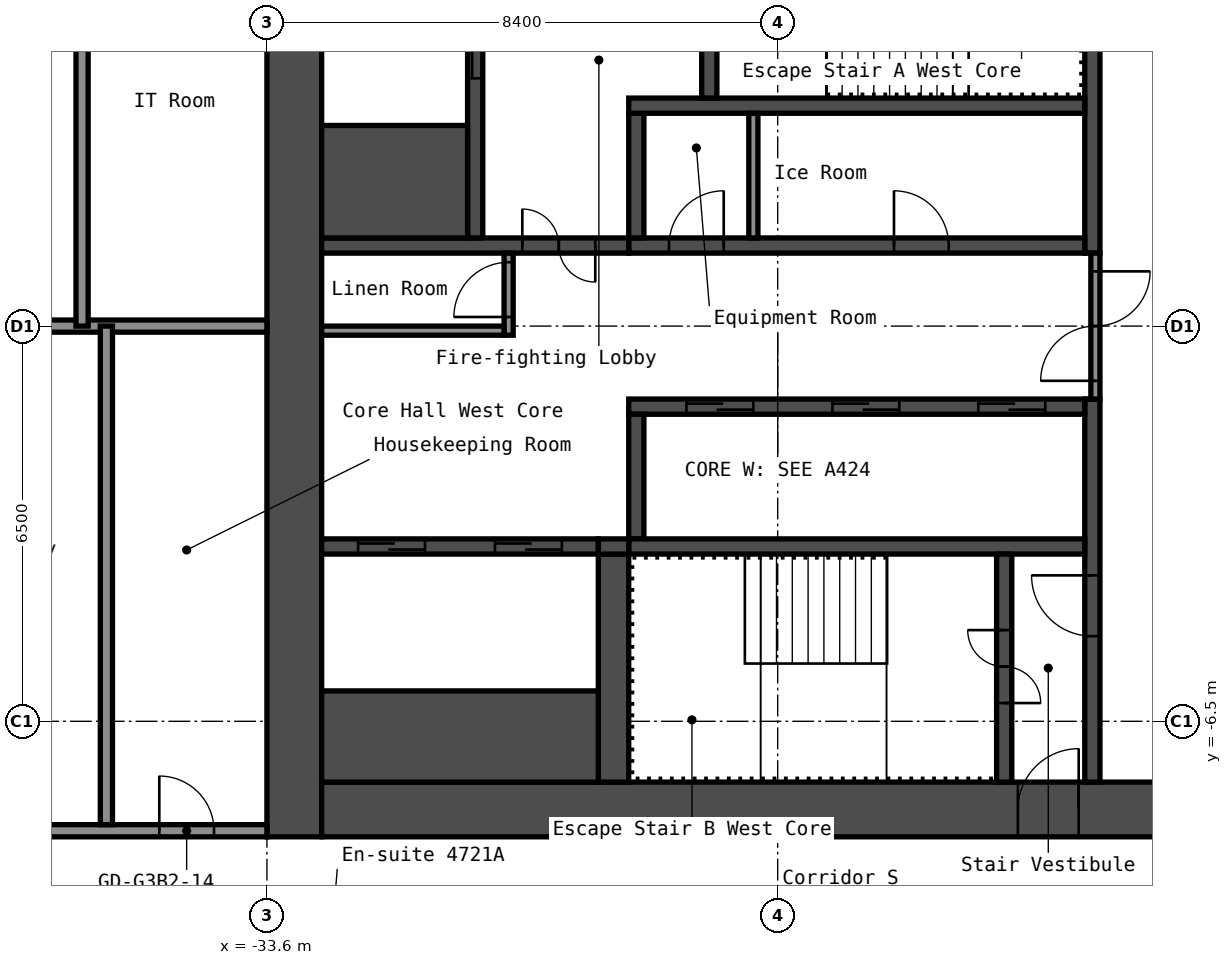
"""IFC4 building model, lengths in metres.
Left out: names, types, materials, properties, quantities, classifications, styles, units other than length and angle.
Written with IfcOpenShell. Run it as: python <this file> out.ifc"""

import sys

from ifc_helpers import new_model, si_unit, direction, frame, frame_2d, origin, place, context, subcontext, project, spatial, rectangle, extrude, element, fill, save


model = new_model("IFC4")
c1 = context("Model", 3, precision=1e-05, world=origin(), true_north=direction((0.0, 1.0)))
c2 = subcontext(c1, "Body", "Model", "MODEL_VIEW")
j1 = project(units=[si_unit("LENGTHUNIT", "METRE"), si_unit("PLANEANGLEUNIT", "RADIAN")], contexts=[c1])
p1 = place(None, origin())
s1 = spatial("IfcSite", under=j1, at=p1, CompositionType="ELEMENT")
p2 = place(p1, origin())
s2 = spatial("IfcBuilding", under=s1, at=p2, CompositionType="ELEMENT")
p3 = place(p2, frame((0.0, 0.0, 166.2)))
s3 = spatial("IfcBuildingStorey", under=s2, at=p3, CompositionType="ELEMENT", Elevation=166.2)
p4 = place(p3, frame((-33.15, -8.4, 0.0), z_axis=(0.0, 0.0, 1.0), x_axis=(0.0, 1.0, 0.0)))
e1 = element("IfcWall", 1, at=p4, inside=s3, PredefinedType="SHEAR", context=c2, shape_type="SweptSolid", body=[
    extrude(rectangle(XDim=16.8, YDim=0.9, at=frame_2d((8.4, 0.0))), origin(), (0.0, 0.0, 1.0), 2.75),
])
p5 = place(p3, frame((-32.7, -7.95, 0.0), z_axis=(0.0, 0.0, 1.0), x_axis=(1.0, 0.0, 0.0)))
e2 = element("IfcWall", 2, at=p5, inside=s3, PredefinedType="SHEAR", context=c2, shape_type="SweptSolid", body=[
    extrude(rectangle(XDim=15.0, YDim=0.9, at=frame_2d((7.5, 0.0))), origin(), (0.0, 0.0, 1.0), 2.75),
])
p6 = place(p5, frame((11.45, 0.0, 0.0)))
e3 = element("IfcOpeningElement", 3, at=p6, cuts=e2, PredefinedType="OPENING", context=c2, shape_type="SweptSolid", body=[
    extrude(rectangle(XDim=1.0, YDim=2.1, at=frame_2d((0.5, 1.05))), frame((0.0, 0.46, 0.0), z_axis=(0.0, -1.0, 0.0), x_axis=(1.0, 0.0, 0.0)), (0.0, 0.0, 1.0), 0.92),
])
p7 = place(p3, frame((-20.025, 1.2, 0.0), z_axis=(0.0, 0.0, 1.0), x_axis=(0.0, 1.0, 0.0)))
e4 = element("IfcWall", 4, at=p7, inside=s3, PredefinedType="SHEAR", context=c2, shape_type="SweptSolid", body=[
    extrude(rectangle(XDim=6.3, YDim=0.25, at=frame_2d((3.15, 0.0))), origin(), (0.0, 0.0, 1.0), 2.75),
])
p8 = place(p3, frame((-20.025, -7.5, 0.0), z_axis=(0.0, 0.0, 1.0), x_axis=(0.0, 1.0, 0.0)))
e5 = element("IfcWall", 5, at=p8, inside=s3, PredefinedType="SHEAR", context=c2, shape_type="SweptSolid", body=[
    extrude(rectangle(XDim=6.3, YDim=0.25, at=frame_2d((3.15, 0.0))), origin(), (0.0, 0.0, 1.0), 2.75),
])
p9 = place(p8, frame((2.4, 0.0, 0.0)))
e6 = element("IfcOpeningElement", 6, at=p9, cuts=e5, PredefinedType="OPENING", context=c2, shape_type="SweptSolid", body=[
    extrude(rectangle(XDim=1.0, YDim=2.1, at=frame_2d((0.5, 1.05))), frame((0.0, 0.135, 0.0), z_axis=(0.0, -1.0, 0.0), x_axis=(1.0, 0.0, 0.0)), (0.0, 0.0, 1.0), 0.27),
])
p10 = place(p3, frame((-27.65, 1.325, 0.0), z_axis=(0.0, 0.0, 1.0), x_axis=(1.0, 0.0, 0.0)))
e7 = element("IfcWall", 7, at=p10, inside=s3, PredefinedType="SHEAR", context=c2, shape_type="SweptSolid", body=[
    extrude(rectangle(XDim=7.5, YDim=0.25, at=frame_2d((3.75, 0.0))), origin(), (0.0, 0.0, 1.0), 2.75),
])
p11 = place(p10, frame((4.363, 0.0, 0.0)))
e8 = element("IfcOpeningElement", 8, at=p11, cuts=e7, PredefinedType="OPENING", context=c2, shape_type="SweptSolid", body=[
    extrude(rectangle(XDim=0.9, YDim=2.1, at=frame_2d((0.45, 1.05))), frame((0.0, 0.135, 0.0), z_axis=(0.0, -1.0, 0.0), x_axis=(1.0, 0.0, 0.0)), (0.0, 0.0, 1.0), 0.27),
])
p12 = place(p10, frame((0.663, 0.0, 0.0)))
e9 = element("IfcOpeningElement", 9, at=p12, cuts=e7, PredefinedType="OPENING", context=c2, shape_type="SweptSolid", body=[
    extrude(rectangle(XDim=0.9, YDim=2.1, at=frame_2d((0.45, 1.05))), frame((0.0, 0.135, 0.0), z_axis=(0.0, -1.0, 0.0), x_axis=(1.0, 0.0, 0.0)), (0.0, 0.0, 1.0), 0.27),
])
p13 = place(p3, frame((-27.525, 1.45, 0.0), z_axis=(0.0, 0.0, 1.0), x_axis=(0.0, 1.0, 0.0)))
e10 = element("IfcWall", 10, at=p13, inside=s3, PredefinedType="SHEAR", context=c2, shape_type="SweptSolid", body=[
    extrude(rectangle(XDim=2.05, YDim=0.25, at=frame_2d((1.025, 0.0))), origin(), (0.0, 0.0, 1.0), 2.75),
])
p14 = place(p3, frame((-27.65, 3.625, 0.0), z_axis=(0.0, 0.0, 1.0), x_axis=(1.0, 0.0, 0.0)))
e11 = element("IfcWall", 11, at=p14, inside=s3, PredefinedType="SHEAR", context=c2, shape_type="SweptSolid", body=[
    extrude(rectangle(XDim=7.5, YDim=0.25, at=frame_2d((3.75, 0.0))), origin(), (0.0, 0.0, 1.0), 2.75),
])
p15 = place(p3, frame((-26.325, 3.75, 0.0), z_axis=(0.0, 0.0, 1.0), x_axis=(0.0, 1.0, 0.0)))
e12 = element("IfcWall", 12, at=p15, inside=s3, PredefinedType="SHEAR", context=c2, shape_type="SweptSolid", body=[
    extrude(rectangle(XDim=3.75, YDim=0.25, at=frame_2d((1.875, 0.0))), origin(), (0.0, 0.0, 1.0), 2.75),
])
p16 = place(p15, frame((1.25, 0.0, 0.0)))
e13 = element("IfcOpeningElement", 13, at=p16, cuts=e12, PredefinedType="OPENING", context=c2, shape_type="SweptSolid", body=[
    extrude(rectangle(XDim=1.2, YDim=2.1, at=frame_2d((0.6, 1.05))), frame((0.0, 0.135, 0.0), z_axis=(0.0, -1.0, 0.0), x_axis=(1.0, 0.0, 0.0)), (0.0, 0.0, 1.0), 0.27),
])
p17 = place(p3, frame((-32.7, 1.325, 0.0), z_axis=(0.0, 0.0, 1.0), x_axis=(1.0, 0.0, 0.0)))
e14 = element("IfcWall", 14, at=p17, inside=s3, PredefinedType="SHEAR", context=c2, shape_type="SweptSolid", body=[
    extrude(rectangle(XDim=5.05, YDim=0.25, at=frame_2d((2.525, 0.0))), origin(), (0.0, 0.0, 1.0), 2.75),
])
p18 = place(p17, frame((3.3, 0.0, 0.0)))
e15 = element("IfcOpeningElement", 15, at=p18, cuts=e14, PredefinedType="OPENING", context=c2, shape_type="SweptSolid", body=[
    extrude(rectangle(XDim=1.2, YDim=2.1, at=frame_2d((0.6, 1.05))), frame((0.0, 0.135, 0.0), z_axis=(0.0, -1.0, 0.0), x_axis=(1.0, 0.0, 0.0)), (0.0, 0.0, 1.0), 0.27),
])
p19 = place(p3, frame((-30.175, 1.45, 0.0), z_axis=(0.0, 0.0, 1.0), x_axis=(0.0, 1.0, 0.0)))
e16 = element("IfcWall", 16, at=p19, inside=s3, PredefinedType="SHEAR", context=c2, shape_type="SweptSolid", body=[
    extrude(rectangle(XDim=6.05, YDim=0.25, at=frame_2d((3.025, 0.0))), origin(), (0.0, 0.0, 1.0), 2.75),
])
p20 = place(p19, frame((2.625, 0.0, 0.0)))
e17 = element("IfcOpeningElement", 17, at=p20, cuts=e16, PredefinedType="OPENING", context=c2, shape_type="SweptSolid", body=[
    extrude(rectangle(XDim=1.1, YDim=2.1, at=frame_2d((0.55, 1.05))), frame((0.0, 0.135, 0.0), z_axis=(0.0, -1.0, 0.0), x_axis=(1.0, 0.0, 0.0)), (0.0, 0.0, 1.0), 0.27),
])
p21 = place(p3, frame((-32.7, 2.375, 0.0), z_axis=(0.0, 0.0, 1.0), x_axis=(1.0, 0.0, 0.0)))
e18 = element("IfcWall", 18, at=p21, inside=s3, PredefinedType="SHEAR", context=c2, shape_type="SweptSolid", body=[
    extrude(rectangle(XDim=2.4, YDim=1.85, at=frame_2d((1.2, 0.0))), origin(), (0.0, 0.0, 1.0), 2.75),
])
p22 = place(p3, frame((-27.65, -1.325, 0.0), z_axis=(0.0, 0.0, 1.0), x_axis=(1.0, 0.0, 0.0)))
e19 = element("IfcWall", 19, at=p22, inside=s3, PredefinedType="SHEAR", context=c2, shape_type="SweptSolid", body=[
    extrude(rectangle(XDim=7.5, YDim=0.25, at=frame_2d((3.75, 0.0))), origin(), (0.0, 0.0, 1.0), 2.75),
])
p23 = place(p22, frame((5.75, 0.0, 0.0)))
e20 = element("IfcOpeningElement", 20, at=p23, cuts=e19, PredefinedType="OPENING", context=c2, shape_type="SweptSolid", body=[
    extrude(rectangle(XDim=1.1, YDim=2.1, at=frame_2d((0.55, 1.05))), frame((0.0, 0.135, 0.0), z_axis=(0.0, -1.0, 0.0), x_axis=(1.0, 0.0, 0.0)), (0.0, 0.0, 1.0), 0.27),
])
p24 = place(p22, frame((3.35, 0.0, 0.0)))
e21 = element("IfcOpeningElement", 21, at=p24, cuts=e19, PredefinedType="OPENING", context=c2, shape_type="SweptSolid", body=[
    extrude(rectangle(XDim=1.1, YDim=2.1, at=frame_2d((0.55, 1.05))), frame((0.0, 0.135, 0.0), z_axis=(0.0, -1.0, 0.0), x_axis=(1.0, 0.0, 0.0)), (0.0, 0.0, 1.0), 0.27),
])
p25 = place(p22, frame((0.95, 0.0, 0.0)))
e22 = element("IfcOpeningElement", 22, at=p25, cuts=e19, PredefinedType="OPENING", context=c2, shape_type="SweptSolid", body=[
    extrude(rectangle(XDim=1.1, YDim=2.1, at=frame_2d((0.55, 1.05))), frame((0.0, 0.135, 0.0), z_axis=(0.0, -1.0, 0.0), x_axis=(1.0, 0.0, 0.0)), (0.0, 0.0, 1.0), 0.27),
])
p26 = place(p3, frame((-27.525, -3.5, 0.0), z_axis=(0.0, 0.0, 1.0), x_axis=(0.0, 1.0, 0.0)))
e23 = element("IfcWall", 23, at=p26, inside=s3, PredefinedType="SHEAR", context=c2, shape_type="SweptSolid", body=[
    extrude(rectangle(XDim=2.05, YDim=0.25, at=frame_2d((1.025, 0.0))), origin(), (0.0, 0.0, 1.0), 2.75),
])
p27 = place(p3, frame((-27.65, -3.625, 0.0), z_axis=(0.0, 0.0, 1.0), x_axis=(1.0, 0.0, 0.0)))
e24 = element("IfcWall", 24, at=p27, inside=s3, PredefinedType="SHEAR", context=c2, shape_type="SweptSolid", body=[
    extrude(rectangle(XDim=7.5, YDim=0.25, at=frame_2d((3.75, 0.0))), origin(), (0.0, 0.0, 1.0), 2.75),
])
p28 = place(p3, frame((-21.475, -7.5, 0.0), z_axis=(0.0, 0.0, 1.0), x_axis=(0.0, 1.0, 0.0)))
e25 = element("IfcWall", 25, at=p28, inside=s3, PredefinedType="SHEAR", context=c2, shape_type="SweptSolid", body=[
    extrude(rectangle(XDim=3.75, YDim=0.25, at=frame_2d((1.875, 0.0))), origin(), (0.0, 0.0, 1.0), 2.75),
])
p29 = place(p28, frame((1.3, 0.0, 0.0)))
e26 = element("IfcOpeningElement", 26, at=p29, cuts=e25, PredefinedType="OPENING", context=c2, shape_type="SweptSolid", body=[
    extrude(rectangle(XDim=1.2, YDim=2.1, at=frame_2d((0.6, 1.05))), frame((0.0, 0.135, 0.0), z_axis=(0.0, -1.0, 0.0), x_axis=(1.0, 0.0, 0.0)), (0.0, 0.0, 1.0), 0.27),
])
p30 = place(p3, frame((-27.9, -7.5, 0.0), z_axis=(0.0, 0.0, 1.0), x_axis=(0.0, 1.0, 0.0)))
e27 = element("IfcWall", 27, at=p30, inside=s3, PredefinedType="SHEAR", context=c2, shape_type="SweptSolid", body=[
    extrude(rectangle(XDim=3.75, YDim=0.5, at=frame_2d((1.875, 0.0))), origin(), (0.0, 0.0, 1.0), 2.75),
])
p31 = place(p3, frame((-32.7, -3.625, 0.0), z_axis=(0.0, 0.0, 1.0), x_axis=(1.0, 0.0, 0.0)))
e28 = element("IfcWall", 28, at=p31, inside=s3, PredefinedType="SHEAR", context=c2, shape_type="SweptSolid", body=[
    extrude(rectangle(XDim=4.55, YDim=0.25, at=frame_2d((2.275, 0.0))), origin(), (0.0, 0.0, 1.0), 2.75),
])
p32 = place(p31, frame((2.85, 0.0, 0.0)))
e29 = element("IfcOpeningElement", 29, at=p32, cuts=e28, PredefinedType="OPENING", context=c2, shape_type="SweptSolid", body=[
    extrude(rectangle(XDim=1.1, YDim=2.1, at=frame_2d((0.55, 1.05))), frame((0.0, 0.135, 0.0), z_axis=(0.0, -1.0, 0.0), x_axis=(1.0, 0.0, 0.0)), (0.0, 0.0, 1.0), 0.27),
])
p33 = place(p31, frame((0.6, 0.0, 0.0)))
e30 = element("IfcOpeningElement", 30, at=p33, cuts=e28, PredefinedType="OPENING", context=c2, shape_type="SweptSolid", body=[
    extrude(rectangle(XDim=1.1, YDim=2.1, at=frame_2d((0.55, 1.05))), frame((0.0, 0.135, 0.0), z_axis=(0.0, -1.0, 0.0), x_axis=(1.0, 0.0, 0.0)), (0.0, 0.0, 1.0), 0.27),
])
p34 = place(p3, frame((-32.7, -6.75, 0.0), z_axis=(0.0, 0.0, 1.0), x_axis=(1.0, 0.0, 0.0)))
e31 = element("IfcWall", 31, at=p34, inside=s3, PredefinedType="SHEAR", context=c2, shape_type="SweptSolid", body=[
    extrude(rectangle(XDim=4.55, YDim=1.5, at=frame_2d((2.275, 0.0))), origin(), (0.0, 0.0, 1.0), 2.75),
])
p35 = place(p3, frame((-28.15, -3.625, 0.0), z_axis=(0.0, 0.0, 1.0), x_axis=(1.0, 0.0, 0.0)))
e32 = element("IfcWall", 32, at=p35, inside=s3, PredefinedType="SHEAR", context=c2, shape_type="SweptSolid", body=[
    extrude(rectangle(XDim=0.5, YDim=0.25, at=frame_2d((0.25, 0.0))), origin(), (0.0, 0.0, 1.0), 2.75),
])
p36 = place(p3, frame((-19.975, -1.2, 0.0), z_axis=(0.0, 0.0, 1.0), x_axis=(0.0, 1.0, 0.0)))
e33 = element("IfcWall", 33, at=p36, inside=s3, PredefinedType="PARTITIONING", context=c2, shape_type="SweptSolid", body=[
    extrude(rectangle(XDim=2.4, YDim=0.15, at=frame_2d((1.2, 0.0))), origin(), (0.0, 0.0, 1.0), 2.75),
])
p37 = place(p36, frame((0.3, 0.0, 0.0)))
e34 = element("IfcOpeningElement", 34, at=p37, cuts=e33, PredefinedType="OPENING", context=c2, shape_type="SweptSolid", body=[
    extrude(rectangle(XDim=1.8, YDim=2.1, at=frame_2d((0.9, 1.05))), frame((0.0, 0.085, 0.0), z_axis=(0.0, -1.0, 0.0), x_axis=(1.0, 0.0, 0.0)), (0.0, 0.0, 1.0), 0.17),
])
p38 = place(p3, frame((-29.625, -0.15, 0.0), z_axis=(0.0, 0.0, 1.0), x_axis=(0.0, 1.0, 0.0)))
e35 = element("IfcWall", 35, at=p38, inside=s3, PredefinedType="PARTITIONING", context=c2, shape_type="SweptSolid", body=[
    extrude(rectangle(XDim=1.35, YDim=0.15, at=frame_2d((0.675, 0.0))), origin(), (0.0, 0.0, 1.0), 2.75),
])
p39 = place(p38, frame((0.3, 0.0, 0.0)))
e36 = element("IfcOpeningElement", 36, at=p39, cuts=e35, PredefinedType="OPENING", context=c2, shape_type="SweptSolid", body=[
    extrude(rectangle(XDim=0.9, YDim=2.1, at=frame_2d((0.45, 1.05))), frame((0.0, 0.085, 0.0), z_axis=(0.0, -1.0, 0.0), x_axis=(1.0, 0.0, 0.0)), (0.0, 0.0, 1.0), 0.17),
])
p40 = place(p3, frame((-32.7, -0.075, 0.0), z_axis=(0.0, 0.0, 1.0), x_axis=(1.0, 0.0, 0.0)))
e37 = element("IfcWall", 37, at=p40, inside=s3, PredefinedType="PARTITIONING", context=c2, shape_type="SweptSolid", body=[
    extrude(rectangle(XDim=3.0, YDim=0.15, at=frame_2d((1.5, 0.0))), origin(), (0.0, 0.0, 1.0), 2.75),
])
p41 = place(p3, frame((-25.6, 1.45, 0.0), z_axis=(0.0, 0.0, 1.0), x_axis=(0.0, 1.0, 0.0)))
e38 = element("IfcWall", 38, at=p41, inside=s3, PredefinedType="PARTITIONING", context=c2, shape_type="SweptSolid", body=[
    extrude(rectangle(XDim=2.05, YDim=0.15, at=frame_2d((1.025, 0.0))), origin(), (0.0, 0.0, 1.0), 2.75),
])
p42 = place(p3, frame((-40.2, -8.3, 0.0), z_axis=(0.0, 0.0, 1.0), x_axis=(1.0, 0.0, 0.0)))
e39 = element("IfcWall", 39, at=p42, inside=s3, PredefinedType="PARTITIONING", context=c2, shape_type="SweptSolid", body=[
    extrude(rectangle(XDim=6.6, YDim=0.2, at=frame_2d((3.3, 0.0))), origin(), (0.0, 0.0, 1.0), 2.75),
])
p43 = place(p42, frame((1.53, 0.0, 0.0)))
e40 = element("IfcOpeningElement", 40, at=p43, cuts=e39, PredefinedType="OPENING", context=c2, shape_type="SweptSolid", body=[
    extrude(rectangle(XDim=0.9, YDim=2.1, at=frame_2d((0.45, 1.05))), frame((0.0, 0.11, 0.0), z_axis=(0.0, -1.0, 0.0), x_axis=(1.0, 0.0, 0.0)), (0.0, 0.0, 1.0), 0.22),
])
p44 = place(p42, frame((4.83, 0.0, 0.0)))
e41 = element("IfcOpeningElement", 41, at=p44, cuts=e39, PredefinedType="OPENING", context=c2, shape_type="SweptSolid", body=[
    extrude(rectangle(XDim=0.9, YDim=2.1, at=frame_2d((0.45, 1.05))), frame((0.0, 0.11, 0.0), z_axis=(0.0, -1.0, 0.0), x_axis=(1.0, 0.0, 0.0)), (0.0, 0.0, 1.0), 0.22),
])
p45 = place(p3, frame((-40.1, 0.0, 0.0), z_axis=(0.0, 0.0, 1.0), x_axis=(1.0, 0.0, 0.0)))
e42 = element("IfcWall", 42, at=p45, inside=s3, PredefinedType="PARTITIONING", context=c2, shape_type="SweptSolid", body=[
    extrude(rectangle(XDim=6.5, YDim=0.2, at=frame_2d((3.25, 0.0))), origin(), (0.0, 0.0, 1.0), 2.75),
])
for number, where, z_axis, x_axis in (
    (43, (-36.64, 0.0, 0.0), (0.0, 0.0, 1.0), (0.0, 1.0, 0.0)),
    (44, (-36.24, -8.2, 0.0), (0.0, 0.0, 1.0), (0.0, 1.0, 0.0)),
):
    element("IfcWall", number, at=place(p3, frame(where, z_axis=z_axis, x_axis=x_axis)), inside=s3, PredefinedType="PARTITIONING", context=c2, shape_type="SweptSolid", body=[
        extrude(rectangle(XDim=8.2, YDim=0.2, at=frame_2d((4.1, 0.0))), origin(), (0.0, 0.0, 1.0), 2.75),
    ])
p46 = place(p6, origin())
e45 = element("IfcDoor", 45, at=p46, inside=s3, OperationType="SINGLE_SWING_LEFT", PredefinedType="DOOR", context=c2, shape_type="SweptSolid", body=[
    extrude(rectangle(XDim=1.0, YDim=2.1, at=frame_2d((0.5, 1.05))), frame((0.0, 0.025, 0.0), z_axis=(0.0, -1.0, 0.0), x_axis=(1.0, 0.0, 0.0)), (0.0, 0.0, 1.0), 0.05),
])
fill(e3, e45)
p47 = place(p29, origin())
e46 = element("IfcDoor", 46, at=p47, inside=s3, OperationType="DOUBLE_DOOR_SINGLE_SWING", PredefinedType="DOOR", context=c2, shape_type="SweptSolid", body=[
    extrude(rectangle(XDim=1.2, YDim=2.1, at=frame_2d((0.6, 1.05))), frame((0.0, 0.025, 0.0), z_axis=(0.0, -1.0, 0.0), x_axis=(1.0, 0.0, 0.0)), (0.0, 0.0, 1.0), 0.05),
])
fill(e26, e46)
p48 = place(p9, origin())
e47 = element("IfcDoor", 47, at=p48, inside=s3, OperationType="SINGLE_SWING_LEFT", PredefinedType="DOOR", context=c2, shape_type="SweptSolid", body=[
    extrude(rectangle(XDim=1.0, YDim=2.1, at=frame_2d((0.5, 1.05))), frame((0.0, 0.025, 0.0), z_axis=(0.0, -1.0, 0.0), x_axis=(1.0, 0.0, 0.0)), (0.0, 0.0, 1.0), 0.05),
])
fill(e6, e47)
p49 = place(p18, origin())
e48 = element("IfcDoor", 48, at=p49, inside=s3, OperationType="DOUBLE_DOOR_SINGLE_SWING", PredefinedType="DOOR", context=c2, shape_type="SweptSolid", body=[
    extrude(rectangle(XDim=1.2, YDim=2.1, at=frame_2d((0.6, 1.05))), frame((0.0, 0.025, 0.0), z_axis=(0.0, -1.0, 0.0), x_axis=(1.0, 0.0, 0.0)), (0.0, 0.0, 1.0), 0.05),
])
fill(e15, e48)
p50 = place(p37, origin())
e49 = element("IfcDoor", 49, at=p50, inside=s3, OperationType="DOUBLE_DOOR_SINGLE_SWING", PredefinedType="DOOR", context=c2, shape_type="SweptSolid", body=[
    extrude(rectangle(XDim=1.8, YDim=2.1, at=frame_2d((0.9, 1.05))), frame((0.0, 0.025, 0.0), z_axis=(0.0, -1.0, 0.0), x_axis=(1.0, 0.0, 0.0)), (0.0, 0.0, 1.0), 0.05),
])
fill(e34, e49)
p51 = place(p39, origin())
e50 = element("IfcDoor", 50, at=p51, inside=s3, OperationType="SINGLE_SWING_RIGHT", PredefinedType="DOOR", context=c2, shape_type="SweptSolid", body=[
    extrude(rectangle(XDim=0.9, YDim=2.1, at=frame_2d((0.45, 1.05))), frame((0.0, 0.025, 0.0), z_axis=(0.0, -1.0, 0.0), x_axis=(1.0, 0.0, 0.0)), (0.0, 0.0, 1.0), 0.05),
])
fill(e36, e50)
p52 = place(p11, origin())
e51 = element("IfcDoor", 51, at=p52, inside=s3, OperationType="SINGLE_SWING_RIGHT", PredefinedType="DOOR", context=c2, shape_type="SweptSolid", body=[
    extrude(rectangle(XDim=0.9, YDim=2.1, at=frame_2d((0.45, 1.05))), frame((0.0, 0.025, 0.0), z_axis=(0.0, -1.0, 0.0), x_axis=(1.0, 0.0, 0.0)), (0.0, 0.0, 1.0), 0.05),
])
fill(e8, e51)
p53 = place(p12, origin())
e52 = element("IfcDoor", 52, at=p53, inside=s3, OperationType="SINGLE_SWING_LEFT", PredefinedType="DOOR", context=c2, shape_type="SweptSolid", body=[
    extrude(rectangle(XDim=0.9, YDim=2.1, at=frame_2d((0.45, 1.05))), frame((0.0, 0.025, 0.0), z_axis=(0.0, -1.0, 0.0), x_axis=(1.0, 0.0, 0.0)), (0.0, 0.0, 1.0), 0.05),
])
fill(e9, e52)
p54 = place(p23, origin())
e53 = element("IfcDoor", 53, at=p54, inside=s3, OperationType="DOUBLE_DOOR_SLIDING", PredefinedType="DOOR", context=c2, shape_type="SweptSolid", body=[
    extrude(rectangle(XDim=1.1, YDim=2.1, at=frame_2d((0.55, 1.05))), frame((0.0, 0.025, 0.0), z_axis=(0.0, -1.0, 0.0), x_axis=(1.0, 0.0, 0.0)), (0.0, 0.0, 1.0), 0.05),
])
fill(e20, e53)
p55 = place(p24, origin())
e54 = element("IfcDoor", 54, at=p55, inside=s3, OperationType="DOUBLE_DOOR_SLIDING", PredefinedType="DOOR", context=c2, shape_type="SweptSolid", body=[
    extrude(rectangle(XDim=1.1, YDim=2.1, at=frame_2d((0.55, 1.05))), frame((0.0, 0.025, 0.0), z_axis=(0.0, -1.0, 0.0), x_axis=(1.0, 0.0, 0.0)), (0.0, 0.0, 1.0), 0.05),
])
fill(e21, e54)
p56 = place(p25, origin())
e55 = element("IfcDoor", 55, at=p56, inside=s3, OperationType="DOUBLE_DOOR_SLIDING", PredefinedType="DOOR", context=c2, shape_type="SweptSolid", body=[
    extrude(rectangle(XDim=1.1, YDim=2.1, at=frame_2d((0.55, 1.05))), frame((0.0, 0.025, 0.0), z_axis=(0.0, -1.0, 0.0), x_axis=(1.0, 0.0, 0.0)), (0.0, 0.0, 1.0), 0.05),
])
fill(e22, e55)
p57 = place(p20, origin())
e56 = element("IfcDoor", 56, at=p57, inside=s3, OperationType="DOUBLE_DOOR_SLIDING", PredefinedType="DOOR", context=c2, shape_type="SweptSolid", body=[
    extrude(rectangle(XDim=1.1, YDim=2.1, at=frame_2d((0.55, 1.05))), frame((0.0, 0.025, 0.0), z_axis=(0.0, -1.0, 0.0), x_axis=(1.0, 0.0, 0.0)), (0.0, 0.0, 1.0), 0.05),
])
fill(e17, e56)
p58 = place(p32, origin())
e57 = element("IfcDoor", 57, at=p58, inside=s3, OperationType="DOUBLE_DOOR_SLIDING", PredefinedType="DOOR", context=c2, shape_type="SweptSolid", body=[
    extrude(rectangle(XDim=1.1, YDim=2.1, at=frame_2d((0.55, 1.05))), frame((0.0, 0.025, 0.0), z_axis=(0.0, -1.0, 0.0), x_axis=(1.0, 0.0, 0.0)), (0.0, 0.0, 1.0), 0.05),
])
fill(e29, e57)
p59 = place(p33, origin())
e58 = element("IfcDoor", 58, at=p59, inside=s3, OperationType="DOUBLE_DOOR_SLIDING", PredefinedType="DOOR", context=c2, shape_type="SweptSolid", body=[
    extrude(rectangle(XDim=1.1, YDim=2.1, at=frame_2d((0.55, 1.05))), frame((0.0, 0.025, 0.0), z_axis=(0.0, -1.0, 0.0), x_axis=(1.0, 0.0, 0.0)), (0.0, 0.0, 1.0), 0.05),
])
fill(e30, e58)
p60 = place(p44, origin())
e59 = element("IfcDoor", 59, at=p60, inside=s3, OperationType="SINGLE_SWING_RIGHT", PredefinedType="DOOR", context=c2, shape_type="SweptSolid", body=[
    extrude(rectangle(XDim=0.9, YDim=2.1, at=frame_2d((0.45, 1.05))), frame((0.0, 0.025, 0.0), z_axis=(0.0, -1.0, 0.0), x_axis=(1.0, 0.0, 0.0)), (0.0, 0.0, 1.0), 0.05),
])
fill(e41, e59)
save(model, sys.argv[1])
